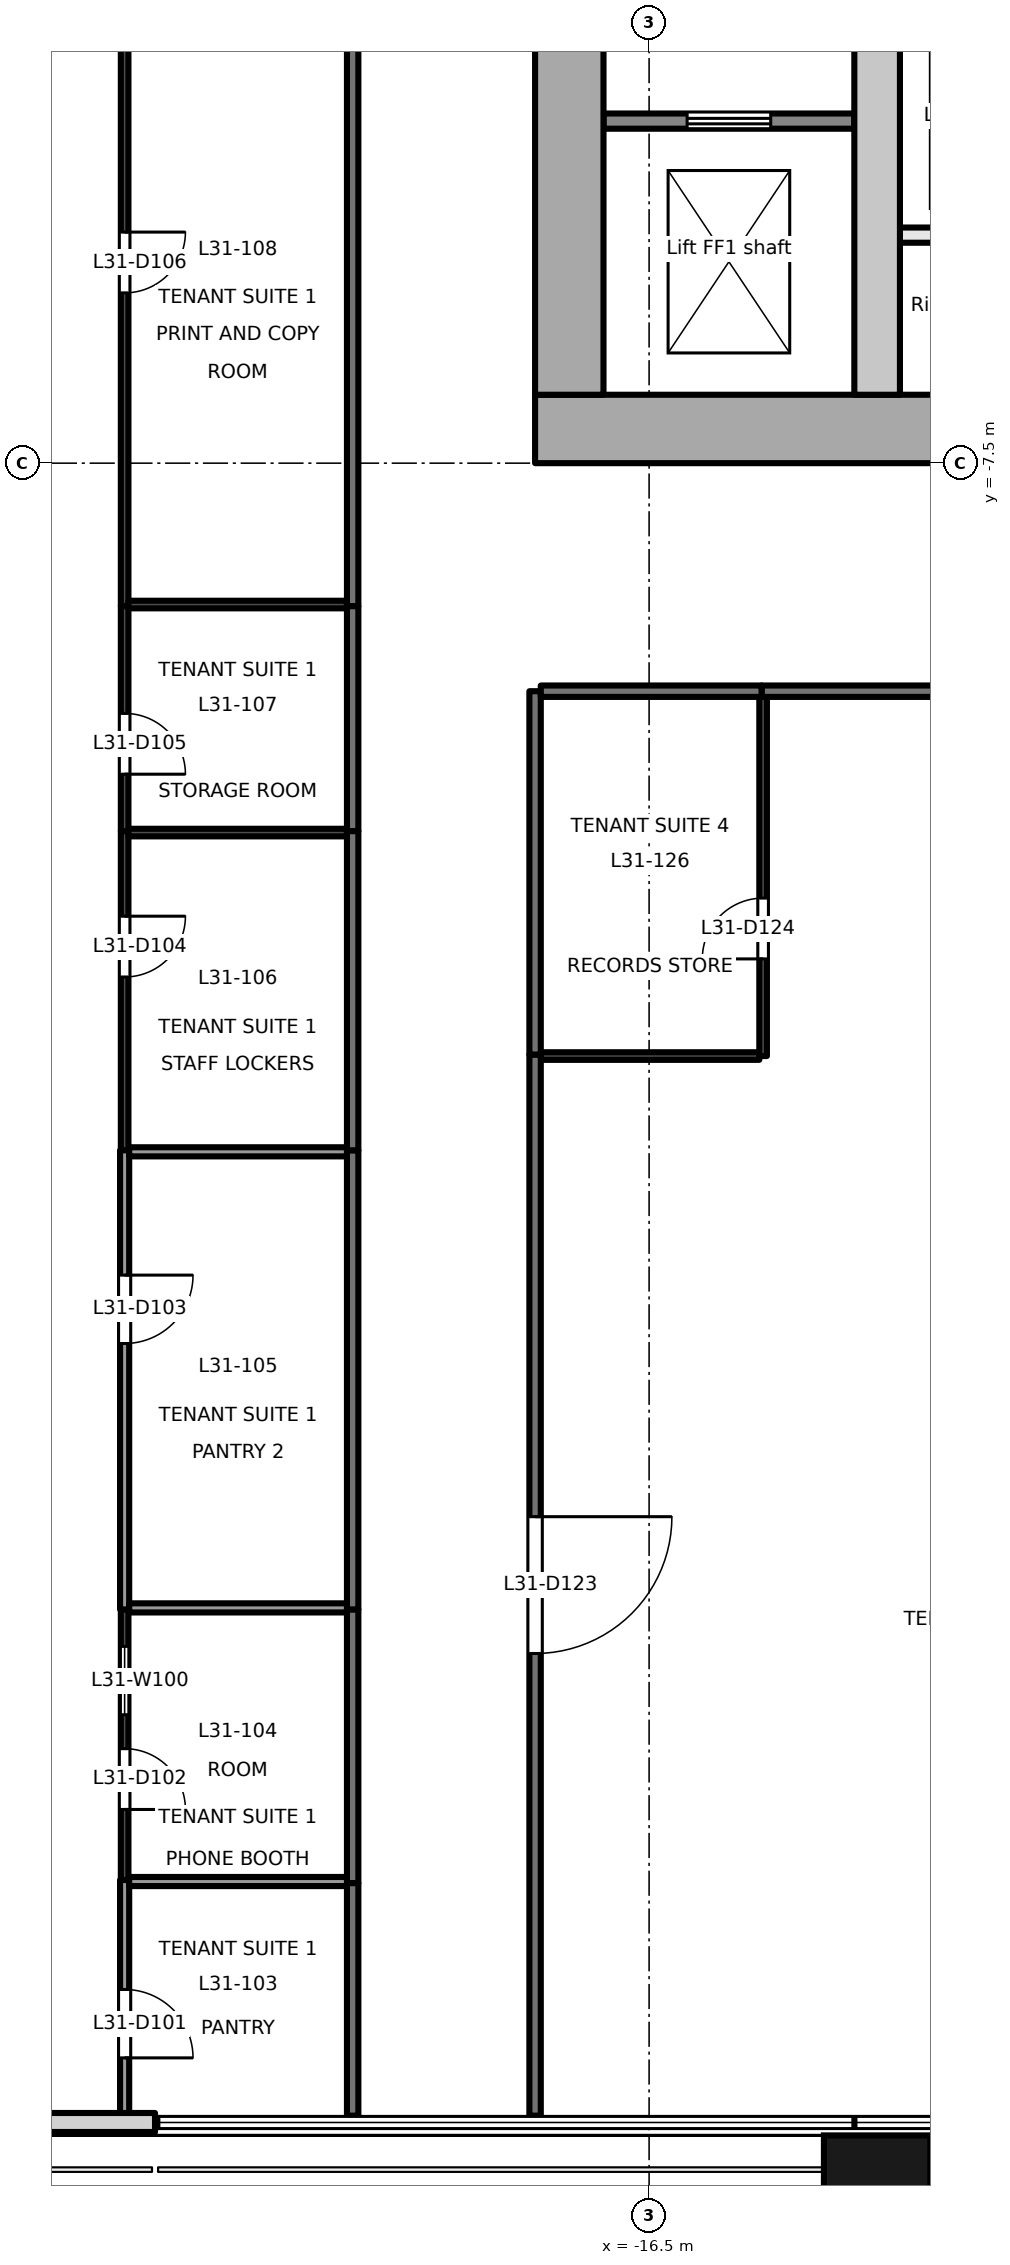
"""IFC4 building model, lengths in metres.
Left out: names, types, materials, properties, quantities, classifications, styles, units other than length and angle.
Written with IfcOpenShell. Run it as: python <this file> out.ifc"""

import sys

from ifc_helpers import new_model, si_unit, direction, frame, frame_2d, origin, origin_2d, place, context, subcontext, project, spatial, rectangle, extrude, element, fill, save


model = new_model("IFC4")
c1 = context("Model", 3, precision=1e-05, world=origin(), true_north=direction((0.0, 1.0)))
c2 = subcontext(c1, "Body", "Model", "MODEL_VIEW")
j1 = project(units=[si_unit("LENGTHUNIT", "METRE"), si_unit("PLANEANGLEUNIT", "RADIAN")], contexts=[c1])
p1 = place(None, origin())
s1 = spatial("IfcSite", under=j1, at=p1, CompositionType="ELEMENT")
p2 = place(p1, origin())
s2 = spatial("IfcBuilding", under=s1, at=p2, CompositionType="ELEMENT")
p3 = place(p2, frame((0.0, 0.0, 138.1)))
s3 = spatial("IfcBuildingStorey", under=s2, at=p3, CompositionType="ELEMENT", Elevation=138.1)
p4 = place(p3, frame((-13.5, -30.4, -0.2), z_axis=(0.0, 0.0, 1.0), x_axis=(1.0, 0.0, 0.0)))
e1 = element("IfcColumn", 1, at=p4, inside=s3, PredefinedType="COLUMN", context=c2, shape_type="SweptSolid", body=[
    extrude(rectangle(XDim=1.4, YDim=1.8, at=origin_2d()), origin(), (0.0, 0.0, 1.0), 4.0),
])
p5 = place(p3, frame((-25.955, -29.33, 0.0), z_axis=(0.0, 0.0, 1.0), x_axis=(1.0, 0.0, 0.0)))
e2 = element("IfcWall", 2, at=p5, inside=s3, PredefinedType="SOLIDWALL", context=c2, shape_type="SweptSolid", body=[
    extrude(rectangle(XDim=2.955, YDim=0.25, at=frame_2d((1.478, 0.0))), origin(), (0.0, 0.0, 1.0), 3.8),
])
p6 = place(p3, frame((-18.0, -7.05, -0.2), z_axis=(0.0, 0.0, 1.0), x_axis=(1.0, 0.0, 0.0)))
e3 = element("IfcWall", 3, at=p6, inside=s3, PredefinedType="SHEAR", context=c2, shape_type="SweptSolid", body=[
    extrude(rectangle(XDim=36.0, YDim=0.9, at=frame_2d((18.0, 0.0))), origin(), (0.0, 0.0, 1.0), 4.0),
])
p7 = place(p6, frame((7.8, 0.0, 0.2)))
e4 = element("IfcOpeningElement", 4, at=p7, cuts=e3, PredefinedType="OPENING", context=c2, shape_type="SweptSolid", body=[
    extrude(rectangle(XDim=2.4, YDim=2.1, at=frame_2d((1.2, 1.05))), frame((0.0, 0.46, 0.0), z_axis=(0.0, -1.0, 0.0), x_axis=(1.0, 0.0, 0.0)), (0.0, 0.0, 1.0), 0.921),
])
p8 = place(p6, frame((17.4, 0.0, 0.2)))
e5 = element("IfcOpeningElement", 5, at=p8, cuts=e3, PredefinedType="OPENING", context=c2, shape_type="SweptSolid", body=[
    extrude(rectangle(XDim=1.2, YDim=2.1, at=frame_2d((0.6, 1.05))), frame((0.0, 0.46, 0.0), z_axis=(0.0, -1.0, 0.0), x_axis=(1.0, 0.0, 0.0)), (0.0, 0.0, 1.0), 0.921),
])
p9 = place(p6, frame((26.1, 0.0, 0.2)))
e6 = element("IfcOpeningElement", 6, at=p9, cuts=e3, PredefinedType="OPENING", context=c2, shape_type="SweptSolid", body=[
    extrude(rectangle(XDim=2.4, YDim=2.1, at=frame_2d((1.2, 1.05))), frame((0.0, 0.46, 0.0), z_axis=(0.0, -1.0, 0.0), x_axis=(1.0, 0.0, 0.0)), (0.0, 0.0, 1.0), 0.921),
])
p10 = place(p3, frame((-17.55, -6.6, -0.2), z_axis=(0.0, 0.0, 1.0), x_axis=(0.0, 1.0, 0.0)))
e7 = element("IfcWall", 7, at=p10, inside=s3, PredefinedType="SHEAR", context=c2, shape_type="SweptSolid", body=[
    extrude(rectangle(XDim=13.2, YDim=0.9, at=frame_2d((6.6, 0.0))), origin(), (0.0, 0.0, 1.0), 4.0),
])
p11 = place(p10, frame((4.55, 0.0, 0.2)))
e8 = element("IfcOpeningElement", 8, at=p11, cuts=e7, PredefinedType="OPENING", context=c2, shape_type="SweptSolid", body=[
    extrude(rectangle(XDim=1.2, YDim=2.1, at=frame_2d((0.6, 1.05))), frame((0.0, 0.46, 0.0), z_axis=(0.0, -1.0, 0.0), x_axis=(1.0, 0.0, 0.0)), (0.0, 0.0, 1.0), 0.921),
])
p12 = place(p3, frame((-13.5, -6.6, -0.2), z_axis=(0.0, 0.0, 1.0), x_axis=(0.0, 1.0, 0.0)))
e9 = element("IfcWall", 9, at=p12, inside=s3, PredefinedType="SHEAR", context=c2, shape_type="SweptSolid", body=[
    extrude(rectangle(XDim=13.2, YDim=0.6, at=frame_2d((6.6, 0.0))), origin(), (0.0, 0.0, 1.0), 4.0),
])
p13 = place(p3, frame((-17.1, -3.0, 0.0), z_axis=(0.0, 0.0, 1.0), x_axis=(1.0, 0.0, 0.0)))
e10 = element("IfcWall", 10, at=p13, inside=s3, PredefinedType="PARTITIONING", context=c2, shape_type="SweptSolid", body=[
    extrude(rectangle(XDim=3.3, YDim=0.2, at=frame_2d((1.65, 0.0))), origin(), (0.0, 0.0, 1.0), 3.8),
])
p14 = place(p13, frame((1.1, 0.0, 0.0)))
e11 = element("IfcOpeningElement", 11, at=p14, cuts=e10, PredefinedType="OPENING", context=c2, shape_type="SweptSolid", body=[
    extrude(rectangle(XDim=1.1, YDim=2.1, at=frame_2d((0.55, 1.05))), frame((0.0, 0.111, 0.0), z_axis=(0.0, -1.0, 0.0), x_axis=(1.0, 0.0, 0.0)), (0.0, 0.0, 1.0), 0.221),
])
p15 = place(p3, frame((-13.2, -4.5, 0.0), z_axis=(0.0, 0.0, 1.0), x_axis=(1.0, 0.0, 0.0)))
e12 = element("IfcWall", 12, at=p15, inside=s3, PredefinedType="PARTITIONING", context=c2, shape_type="SweptSolid", body=[
    extrude(rectangle(XDim=2.3, YDim=0.2, at=frame_2d((1.15, 0.0))), origin(), (0.0, 0.0, 1.0), 3.8),
])
p16 = place(p3, frame((-20.4, -29.24, 0.0), z_axis=(0.0, 0.0, 1.0), x_axis=(0.0, 1.0, 0.0)))
e13 = element("IfcWall", 13, at=p16, inside=s3, PredefinedType="PARTITIONING", context=c2, shape_type="SweptSolid", body=[
    extrude(rectangle(XDim=3.06, YDim=0.15, at=frame_2d((1.53, 0.0))), origin(), (0.0, 0.0, 1.0), 3.8),
])
p17 = place(p3, frame((-20.4, -26.18, 0.0), z_axis=(0.0, 0.0, 1.0), x_axis=(0.0, 1.0, 0.0)))
e14 = element("IfcWall", 14, at=p17, inside=s3, PredefinedType="PARTITIONING", context=c2, shape_type="SweptSolid", body=[
    extrude(rectangle(XDim=3.6, YDim=0.15, at=frame_2d((1.8, 0.0))), origin(), (0.0, 0.0, 1.0), 3.8),
])
p18 = place(p3, frame((-20.4, -22.58, 0.0), z_axis=(0.0, 0.0, 1.0), x_axis=(0.0, 1.0, 0.0)))
e15 = element("IfcWall", 15, at=p18, inside=s3, PredefinedType="PARTITIONING", context=c2, shape_type="SweptSolid", body=[
    extrude(rectangle(XDim=6.04, YDim=0.15, at=frame_2d((3.02, 0.0))), origin(), (0.0, 0.0, 1.0), 3.8),
])
p19 = place(p3, frame((-20.4, -16.54, 0.0), z_axis=(0.0, 0.0, 1.0), x_axis=(0.0, 1.0, 0.0)))
e16 = element("IfcWall", 16, at=p19, inside=s3, PredefinedType="PARTITIONING", context=c2, shape_type="SweptSolid", body=[
    extrude(rectangle(XDim=4.2, YDim=0.15, at=frame_2d((2.1, 0.0))), origin(), (0.0, 0.0, 1.0), 3.8),
])
p20 = place(p3, frame((-20.4, -12.34, 0.0), z_axis=(0.0, 0.0, 1.0), x_axis=(0.0, 1.0, 0.0)))
e17 = element("IfcWall", 17, at=p20, inside=s3, PredefinedType="PARTITIONING", context=c2, shape_type="SweptSolid", body=[
    extrude(rectangle(XDim=2.96, YDim=0.15, at=frame_2d((1.48, 0.0))), origin(), (0.0, 0.0, 1.0), 3.8),
])
p21 = place(p3, frame((-20.4, -9.38, 0.0), z_axis=(0.0, 0.0, 1.0), x_axis=(0.0, 1.0, 0.0)))
e18 = element("IfcWall", 18, at=p21, inside=s3, PredefinedType="PARTITIONING", context=c2, shape_type="SweptSolid", body=[
    extrude(rectangle(XDim=9.04, YDim=0.15, at=frame_2d((4.52, 0.0))), origin(), (0.0, 0.0, 1.0), 3.3),
])
p22 = place(p3, frame((-18.0, -15.28, 0.0), z_axis=(0.0, 0.0, 1.0), x_axis=(0.0, -1.0, 0.0)))
e19 = element("IfcWall", 19, at=p22, inside=s3, PredefinedType="PARTITIONING", context=c2, shape_type="SweptSolid", body=[
    extrude(rectangle(XDim=13.96, YDim=0.15, at=frame_2d((6.98, 0.0))), origin(), (0.0, 0.0, 1.0), 3.8),
])
p23 = place(p22, frame((6.08, 0.0, 0.0)))
e20 = element("IfcOpeningElement", 20, at=p23, cuts=e19, PredefinedType="OPENING", context=c2, shape_type="SweptSolid", body=[
    extrude(rectangle(XDim=1.8, YDim=2.1, at=frame_2d((0.9, 1.05))), frame((0.0, 0.085, 0.0), z_axis=(0.0, -1.0, 0.0), x_axis=(1.0, 0.0, 0.0)), (0.0, 0.0, 1.0), 0.171),
])
p24 = place(p3, frame((-9.92, -10.5, 0.0), z_axis=(0.0, 0.0, 1.0), x_axis=(-1.0, 0.0, 0.0)))
e21 = element("IfcWall", 21, at=p24, inside=s3, PredefinedType="PARTITIONING", context=c2, shape_type="SweptSolid", body=[
    extrude(rectangle(XDim=5.1, YDim=0.15, at=frame_2d((2.55, 0.0))), origin(), (0.0, 0.0, 1.0), 2.9),
])
p25 = place(p3, frame((-18.0, -10.5, 0.0), z_axis=(0.0, 0.0, 1.0), x_axis=(0.0, -1.0, 0.0)))
e22 = element("IfcWall", 22, at=p25, inside=s3, PredefinedType="PARTITIONING", context=c2, shape_type="SweptSolid", body=[
    extrude(rectangle(XDim=4.78, YDim=0.15, at=frame_2d((2.39, 0.0))), origin(), (0.0, 0.0, 1.0), 3.8),
])
p26 = place(p3, frame((-15.02, -10.5, 0.0), z_axis=(0.0, 0.0, 1.0), x_axis=(-1.0, 0.0, 0.0)))
e23 = element("IfcWall", 23, at=p26, inside=s3, PredefinedType="PARTITIONING", context=c2, shape_type="SweptSolid", body=[
    extrude(rectangle(XDim=2.905, YDim=0.15, at=frame_2d((1.453, 0.0))), origin(), (0.0, 0.0, 1.0), 3.8),
])
p27 = place(p3, frame((-23.4, -26.14, 0.0), z_axis=(0.0, 0.0, 1.0), x_axis=(0.0, -1.0, 0.0)))
e24 = element("IfcWall", 24, at=p27, inside=s3, PredefinedType="PARTITIONING", context=c2, shape_type="SweptSolid", body=[
    extrude(rectangle(XDim=3.1, YDim=0.12, at=frame_2d((1.55, 0.0))), origin(), (0.0, 0.0, 1.0), 3.8),
])
p28 = place(p27, frame((1.44, 0.0, 0.0)))
e25 = element("IfcOpeningElement", 25, at=p28, cuts=e24, PredefinedType="OPENING", context=c2, shape_type="SweptSolid", body=[
    extrude(rectangle(XDim=0.9, YDim=2.1, at=frame_2d((0.45, 1.05))), frame((0.0, 0.071, 0.0), z_axis=(0.0, -1.0, 0.0), x_axis=(1.0, 0.0, 0.0)), (0.0, 0.0, 1.0), 0.141),
])
p29 = place(p3, frame((-23.4, -22.58, 0.0), z_axis=(0.0, 0.0, 1.0), x_axis=(0.0, -1.0, 0.0)))
e26 = element("IfcWall", 26, at=p29, inside=s3, PredefinedType="PARTITIONING", context=c2, shape_type="SweptSolid", body=[
    extrude(rectangle(XDim=3.56, YDim=0.1, at=frame_2d((1.78, 0.0))), origin(), (0.0, 0.0, 1.0), 3.8),
])
p30 = place(p29, frame((1.832, 0.0, 0.0)))
e27 = element("IfcOpeningElement", 27, at=p30, cuts=e26, PredefinedType="OPENING", context=c2, shape_type="SweptSolid", body=[
    extrude(rectangle(XDim=0.8, YDim=2.1, at=frame_2d((0.4, 1.05))), frame((0.0, 0.061, 0.0), z_axis=(0.0, -1.0, 0.0), x_axis=(1.0, 0.0, 0.0)), (0.0, 0.0, 1.0), 0.121),
])
p31 = place(p29, frame((0.486, 0.0, 0.9)))
e28 = element("IfcOpeningElement", 28, at=p31, cuts=e26, PredefinedType="OPENING", context=c2, shape_type="SweptSolid", body=[
    extrude(rectangle(XDim=0.9, YDim=1.2, at=frame_2d((0.45, 0.6))), frame((0.0, 0.061, 0.0), z_axis=(0.0, -1.0, 0.0), x_axis=(1.0, 0.0, 0.0)), (0.0, 0.0, 1.0), 0.121),
])
p32 = place(p3, frame((-23.4, -16.54, 0.0), z_axis=(0.0, 0.0, 1.0), x_axis=(0.0, -1.0, 0.0)))
e29 = element("IfcWall", 29, at=p32, inside=s3, PredefinedType="PARTITIONING", context=c2, shape_type="SweptSolid", body=[
    extrude(rectangle(XDim=6.04, YDim=0.12, at=frame_2d((3.02, 0.0))), origin(), (0.0, 0.0, 1.0), 3.8),
])
p33 = place(p32, frame((1.642, 0.0, 0.0)))
e30 = element("IfcOpeningElement", 30, at=p33, cuts=e29, PredefinedType="OPENING", context=c2, shape_type="SweptSolid", body=[
    extrude(rectangle(XDim=0.9, YDim=2.1, at=frame_2d((0.45, 1.05))), frame((0.0, 0.071, 0.0), z_axis=(0.0, -1.0, 0.0), x_axis=(1.0, 0.0, 0.0)), (0.0, 0.0, 1.0), 0.141),
])
p34 = place(p3, frame((-23.4, -12.34, 0.0), z_axis=(0.0, 0.0, 1.0), x_axis=(0.0, -1.0, 0.0)))
e31 = element("IfcWall", 31, at=p34, inside=s3, PredefinedType="PARTITIONING", context=c2, shape_type="SweptSolid", body=[
    extrude(rectangle(XDim=4.2, YDim=0.1, at=frame_2d((2.1, 0.0))), origin(), (0.0, 0.0, 1.0), 3.8),
])
p35 = place(p34, frame((1.12, 0.0, 0.0)))
e32 = element("IfcOpeningElement", 32, at=p35, cuts=e31, PredefinedType="OPENING", context=c2, shape_type="SweptSolid", body=[
    extrude(rectangle(XDim=0.8, YDim=2.1, at=frame_2d((0.4, 1.05))), frame((0.0, 0.061, 0.0), z_axis=(0.0, -1.0, 0.0), x_axis=(1.0, 0.0, 0.0)), (0.0, 0.0, 1.0), 0.121),
])
p36 = place(p3, frame((-23.4, -9.38, 0.0), z_axis=(0.0, 0.0, 1.0), x_axis=(0.0, -1.0, 0.0)))
e33 = element("IfcWall", 33, at=p36, inside=s3, PredefinedType="PARTITIONING", context=c2, shape_type="SweptSolid", body=[
    extrude(rectangle(XDim=2.96, YDim=0.1, at=frame_2d((1.48, 0.0))), origin(), (0.0, 0.0, 1.0), 3.8),
])
p37 = place(p36, frame((1.412, 0.0, 0.0)))
e34 = element("IfcOpeningElement", 34, at=p37, cuts=e33, PredefinedType="OPENING", context=c2, shape_type="SweptSolid", body=[
    extrude(rectangle(XDim=0.8, YDim=2.1, at=frame_2d((0.4, 1.05))), frame((0.0, 0.061, 0.0), z_axis=(0.0, -1.0, 0.0), x_axis=(1.0, 0.0, 0.0)), (0.0, 0.0, 1.0), 0.121),
])
p38 = place(p3, frame((-23.4, -0.34, 0.0), z_axis=(0.0, 0.0, 1.0), x_axis=(0.0, -1.0, 0.0)))
e35 = element("IfcWall", 35, at=p38, inside=s3, PredefinedType="PARTITIONING", context=c2, shape_type="SweptSolid", body=[
    extrude(rectangle(XDim=9.04, YDim=0.1, at=frame_2d((4.52, 0.0))), origin(), (0.0, 0.0, 1.0), 3.3),
])
p39 = place(p38, frame((4.12, 0.0, 0.0)))
e36 = element("IfcOpeningElement", 36, at=p39, cuts=e35, PredefinedType="OPENING", context=c2, shape_type="SweptSolid", body=[
    extrude(rectangle(XDim=0.8, YDim=2.1, at=frame_2d((0.4, 1.05))), frame((0.0, 0.061, 0.0), z_axis=(0.0, -1.0, 0.0), x_axis=(1.0, 0.0, 0.0)), (0.0, 0.0, 1.0), 0.121),
])
for number, where, z_axis, x_axis in (
    (37, (-23.34, -26.16, 0.0), (0.0, 0.0, 1.0), (1.0, 0.0, 0.0)),
    (38, (-23.34, -22.56, 0.0), (0.0, 0.0, 1.0), (1.0, 0.0, 0.0)),
    (39, (-23.34, -16.56, 0.0), (0.0, 0.0, 1.0), (1.0, 0.0, 0.0)),
):
    element("IfcWall", number, at=place(p3, frame(where, z_axis=z_axis, x_axis=x_axis)), inside=s3, PredefinedType="PARTITIONING", context=c2, shape_type="SweptSolid", body=[
        extrude(rectangle(XDim=2.865, YDim=0.12, at=frame_2d((1.433, 0.0))), origin(), (0.0, 0.0, 1.0), 3.8),
    ])
for number, where, z_axis, x_axis in (
    (40, (-23.35, -12.36, 0.0), (0.0, 0.0, 1.0), (1.0, 0.0, 0.0)),
    (41, (-23.35, -9.36, 0.0), (0.0, 0.0, 1.0), (1.0, 0.0, 0.0)),
    (42, (-17.925, -15.3, 0.0), (0.0, 0.0, 1.0), (1.0, 0.0, 0.0)),
):
    element("IfcWall", number, at=place(p3, frame(where, z_axis=z_axis, x_axis=x_axis)), inside=s3, PredefinedType="PARTITIONING", context=c2, shape_type="SweptSolid", body=[
        extrude(rectangle(XDim=2.875, YDim=0.1, at=frame_2d((1.438, 0.0))), origin(), (0.0, 0.0, 1.0), 3.8),
    ])
p40 = place(p3, frame((-15.0, -15.3, 0.0), z_axis=(0.0, 0.0, 1.0), x_axis=(0.0, 1.0, 0.0)))
e43 = element("IfcWall", 43, at=p40, inside=s3, PredefinedType="PARTITIONING", context=c2, shape_type="SweptSolid", body=[
    extrude(rectangle(XDim=4.725, YDim=0.1, at=frame_2d((2.363, 0.0))), origin(), (0.0, 0.0, 1.0), 3.8),
])
p41 = place(p40, frame((1.278, 0.0, 0.0)))
e44 = element("IfcOpeningElement", 44, at=p41, cuts=e43, PredefinedType="OPENING", context=c2, shape_type="SweptSolid", body=[
    extrude(rectangle(XDim=0.8, YDim=2.1, at=frame_2d((0.4, 1.05))), frame((0.0, 0.061, 0.0), z_axis=(0.0, -1.0, 0.0), x_axis=(1.0, 0.0, 0.0)), (0.0, 0.0, 1.0), 0.121),
])
p42 = place(p14, origin())
e45 = element("IfcDoor", 45, at=p42, inside=s3, OperationType="DOUBLE_DOOR_SLIDING", PredefinedType="DOOR", context=c2, shape_type="SweptSolid", body=[
    extrude(rectangle(XDim=1.1, YDim=2.1, at=frame_2d((0.55, 1.05))), frame((0.0, 0.025, 0.0), z_axis=(0.0, -1.0, 0.0), x_axis=(1.0, 0.0, 0.0)), (0.0, 0.0, 1.0), 0.05),
])
fill(e11, e45)
p43 = place(p28, origin())
e46 = element("IfcDoor", 46, at=p43, inside=s3, OperationType="SINGLE_SWING_RIGHT", PredefinedType="DOOR", context=c2, shape_type="SweptSolid", body=[
    extrude(rectangle(XDim=0.9, YDim=2.1, at=frame_2d((0.45, 1.05))), frame((0.0, 0.025, 0.0), z_axis=(0.0, -1.0, 0.0), x_axis=(1.0, 0.0, 0.0)), (0.0, 0.0, 1.0), 0.05),
])
fill(e25, e46)
p44 = place(p30, origin())
e47 = element("IfcDoor", 47, at=p44, inside=s3, OperationType="SINGLE_SWING_RIGHT", PredefinedType="DOOR", context=c2, shape_type="SweptSolid", body=[
    extrude(rectangle(XDim=0.8, YDim=2.1, at=frame_2d((0.4, 1.05))), frame((0.0, 0.025, 0.0), z_axis=(0.0, -1.0, 0.0), x_axis=(1.0, 0.0, 0.0)), (0.0, 0.0, 1.0), 0.05),
])
fill(e27, e47)
p45 = place(p33, origin())
e48 = element("IfcDoor", 48, at=p45, inside=s3, OperationType="SINGLE_SWING_LEFT", PredefinedType="DOOR", context=c2, shape_type="SweptSolid", body=[
    extrude(rectangle(XDim=0.9, YDim=2.1, at=frame_2d((0.45, 1.05))), frame((0.0, 0.025, 0.0), z_axis=(0.0, -1.0, 0.0), x_axis=(1.0, 0.0, 0.0)), (0.0, 0.0, 1.0), 0.05),
])
fill(e30, e48)
p46 = place(p35, origin())
e49 = element("IfcDoor", 49, at=p46, inside=s3, OperationType="SINGLE_SWING_LEFT", PredefinedType="DOOR", context=c2, shape_type="SweptSolid", body=[
    extrude(rectangle(XDim=0.8, YDim=2.1, at=frame_2d((0.4, 1.05))), frame((0.0, 0.025, 0.0), z_axis=(0.0, -1.0, 0.0), x_axis=(1.0, 0.0, 0.0)), (0.0, 0.0, 1.0), 0.05),
])
fill(e32, e49)
p47 = place(p37, origin())
e50 = element("IfcDoor", 50, at=p47, inside=s3, OperationType="SINGLE_SWING_RIGHT", PredefinedType="DOOR", context=c2, shape_type="SweptSolid", body=[
    extrude(rectangle(XDim=0.8, YDim=2.1, at=frame_2d((0.4, 1.05))), frame((0.0, 0.025, 0.0), z_axis=(0.0, -1.0, 0.0), x_axis=(1.0, 0.0, 0.0)), (0.0, 0.0, 1.0), 0.05),
])
fill(e34, e50)
p48 = place(p39, origin())
e51 = element("IfcDoor", 51, at=p48, inside=s3, OperationType="SINGLE_SWING_LEFT", PredefinedType="DOOR", context=c2, shape_type="SweptSolid", body=[
    extrude(rectangle(XDim=0.8, YDim=2.1, at=frame_2d((0.4, 1.05))), frame((0.0, 0.025, 0.0), z_axis=(0.0, -1.0, 0.0), x_axis=(1.0, 0.0, 0.0)), (0.0, 0.0, 1.0), 0.05),
])
fill(e36, e51)
p49 = place(p23, origin())
e52 = element("IfcDoor", 52, at=p49, inside=s3, OperationType="DOUBLE_DOOR_SINGLE_SWING", PredefinedType="DOOR", context=c2, shape_type="SweptSolid", body=[
    extrude(rectangle(XDim=1.8, YDim=2.1, at=frame_2d((0.9, 1.05))), frame((0.0, 0.025, 0.0), z_axis=(0.0, -1.0, 0.0), x_axis=(1.0, 0.0, 0.0)), (0.0, 0.0, 1.0), 0.05),
])
fill(e20, e52)
p50 = place(p41, origin())
e53 = element("IfcDoor", 53, at=p50, inside=s3, OperationType="SINGLE_SWING_LEFT", PredefinedType="DOOR", context=c2, shape_type="SweptSolid", body=[
    extrude(rectangle(XDim=0.8, YDim=2.1, at=frame_2d((0.4, 1.05))), frame((0.0, 0.025, 0.0), z_axis=(0.0, -1.0, 0.0), x_axis=(1.0, 0.0, 0.0)), (0.0, 0.0, 1.0), 0.05),
])
fill(e44, e53)
p51 = place(p31, origin())
e54 = element("IfcWindow", 54, at=p51, inside=s3, PartitioningType="SINGLE_PANEL", PredefinedType="WINDOW", context=c2, shape_type="SweptSolid", body=[
    extrude(rectangle(XDim=0.9, YDim=1.2, at=frame_2d((0.45, 0.6))), frame((0.0, 0.03, 0.0), z_axis=(0.0, -1.0, 0.0), x_axis=(1.0, 0.0, 0.0)), (0.0, 0.0, 1.0), 0.06),
])
fill(e28, e54)
save(model, sys.argv[1])
